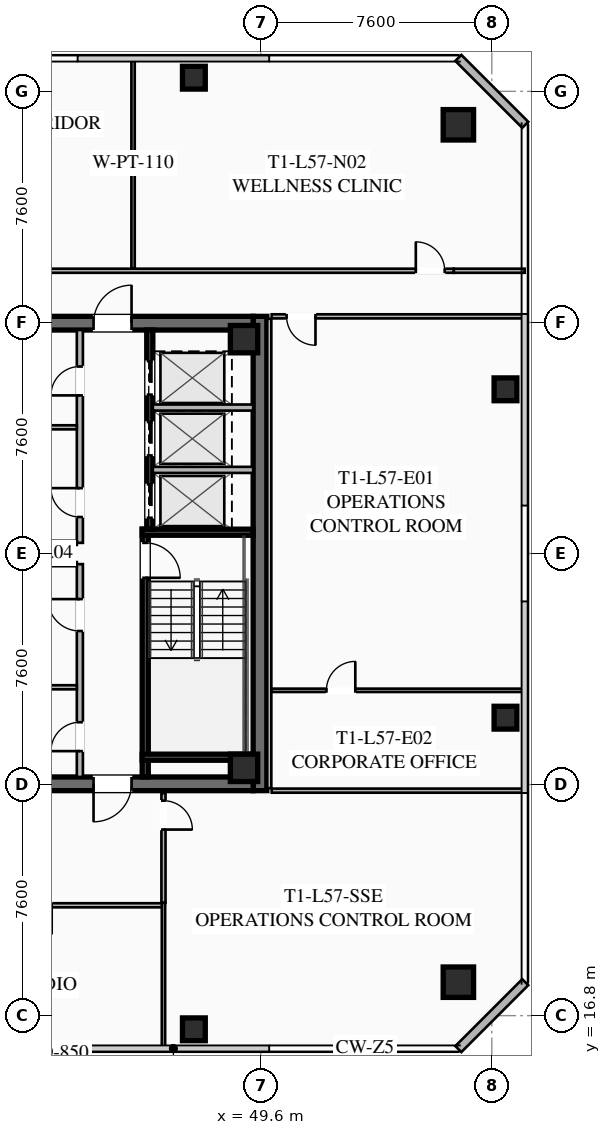
"""IFC4 building model, lengths in metres.
Left out: names, types, materials, properties, quantities, classifications, styles, units other than length and angle.
Written with IfcOpenShell. Run it as: python <this file> out.ifc"""

import sys

from ifc_helpers import new_model, si_unit, direction, frame, frame_2d, origin, origin_2d, place, context, subcontext, project, spatial, rectangle, hollow_rectangle, extrude, element, fill, save


model = new_model("IFC4")
c1 = context("Model", 3, precision=1e-05, world=origin(), true_north=direction((0.0, 1.0)))
c2 = subcontext(c1, "Body", "Model", "MODEL_VIEW")
j1 = project(units=[si_unit("LENGTHUNIT", "METRE"), si_unit("PLANEANGLEUNIT", "RADIAN")], contexts=[c1])
p1 = place(None, origin())
s1 = spatial("IfcSite", under=j1, at=p1, CompositionType="ELEMENT")
p2 = place(p1, origin())
s2 = spatial("IfcBuilding", under=s1, at=p2, CompositionType="ELEMENT")
p3 = place(p2, frame((0.0, 0.0, 211.3)))
s3 = spatial("IfcBuildingStorey", under=s2, at=p3, CompositionType="ELEMENT", Elevation=211.3)
p4 = place(p3, frame((49.575, 39.8, 0.0), z_axis=(0.0, 0.0, 1.0), x_axis=(0.0, -1.0, 0.0)))
e1 = element("IfcWall", 1, at=p4, inside=s3, PredefinedType="SHEAR", context=c2, shape_type="SweptSolid", body=[
    extrude(rectangle(XDim=15.6, YDim=0.45, at=frame_2d((7.8, 0.0))), origin(), (0.0, 0.0, 1.0), 3.55),
])
p5 = place(p3, frame((49.35, 24.425, 0.0), z_axis=(0.0, 0.0, 1.0), x_axis=(-1.0, 0.0, 0.0)))
e2 = element("IfcWall", 2, at=p5, inside=s3, PredefinedType="SHEAR", context=c2, shape_type="SweptSolid", body=[
    extrude(rectangle(XDim=14.7, YDim=0.45, at=frame_2d((7.35, 0.0))), origin(), (0.0, 0.0, 1.0), 3.55),
])
p6 = place(p5, frame((9.05, 0.0, 0.0)))
e3 = element("IfcOpeningElement", 3, at=p6, cuts=e2, PredefinedType="OPENING", context=c2, shape_type="SweptSolid", body=[
    extrude(rectangle(XDim=1.25, YDim=2.25, at=frame_2d((0.625, 1.125))), frame((0.0, 0.235, 0.0), z_axis=(0.0, -1.0, 0.0), x_axis=(1.0, 0.0, 0.0)), (0.0, 0.0, 1.0), 0.47),
])
p7 = place(p5, frame((4.0, 0.0, 0.0)))
e4 = element("IfcOpeningElement", 4, at=p7, cuts=e2, PredefinedType="OPENING", context=c2, shape_type="SweptSolid", body=[
    extrude(rectangle(XDim=1.25, YDim=2.25, at=frame_2d((0.625, 1.125))), frame((0.0, 0.235, 0.0), z_axis=(0.0, -1.0, 0.0), x_axis=(1.0, 0.0, 0.0)), (0.0, 0.0, 1.0), 0.47),
])
p8 = place(p3, frame((34.65, 39.575, 0.0), z_axis=(0.0, 0.0, 1.0), x_axis=(1.0, 0.0, 0.0)))
e5 = element("IfcWall", 5, at=p8, inside=s3, PredefinedType="SHEAR", context=c2, shape_type="SweptSolid", body=[
    extrude(rectangle(XDim=14.7, YDim=0.45, at=frame_2d((7.35, 0.0))), origin(), (0.0, 0.0, 1.0), 3.55),
])
p9 = place(p8, frame((4.4, 0.0, 0.0)))
e6 = element("IfcOpeningElement", 6, at=p9, cuts=e5, PredefinedType="OPENING", context=c2, shape_type="SweptSolid", body=[
    extrude(rectangle(XDim=1.25, YDim=2.25, at=frame_2d((0.625, 1.125))), frame((0.0, 0.235, 0.0), z_axis=(0.0, -1.0, 0.0), x_axis=(1.0, 0.0, 0.0)), (0.0, 0.0, 1.0), 0.47),
])
p10 = place(p8, frame((9.45, 0.0, 0.0)))
e7 = element("IfcOpeningElement", 7, at=p10, cuts=e5, PredefinedType="OPENING", context=c2, shape_type="SweptSolid", body=[
    extrude(rectangle(XDim=1.25, YDim=2.25, at=frame_2d((0.625, 1.125))), frame((0.0, 0.235, 0.0), z_axis=(0.0, -1.0, 0.0), x_axis=(1.0, 0.0, 0.0)), (0.0, 0.0, 1.0), 0.47),
])
for number, where, z_axis, x_axis in (
    (8, (49.05, 24.95, 0.0), (0.0, 0.0, 1.0), (1.0, 0.0, 0.0)),
    (9, (49.05, 39.05, 0.0), (0.0, 0.0, 1.0), (1.0, 0.0, 0.0)),
):
    element("IfcColumn", number, at=place(p3, frame(where, z_axis=z_axis, x_axis=x_axis)), inside=s3, PredefinedType="COLUMN", context=c2, shape_type="SweptSolid", body=[
        extrude(hollow_rectangle(XDim=0.9, YDim=0.9, WallThickness=0.04, at=origin_2d()), origin(), (0.0, 0.0, 1.0), 3.37),
    ])
for number, where, z_axis, x_axis in (
    (10, (56.1, 17.9, 0.0), (0.0, 0.0, 1.0), (1.0, 0.0, 0.0)),
    (11, (56.1, 46.1, 0.0), (0.0, 0.0, 1.0), (1.0, 0.0, 0.0)),
):
    element("IfcColumn", number, at=place(p3, frame(where, z_axis=z_axis, x_axis=x_axis)), inside=s3, PredefinedType="COLUMN", context=c2, shape_type="SweptSolid", body=[
        extrude(hollow_rectangle(XDim=1.0, YDim=1.0, WallThickness=0.04, at=origin_2d()), origin(), (0.0, 0.0, 1.0), 3.37),
    ])
for number, where, z_axis, x_axis in (
    (12, (47.4, 16.35, 0.0), (0.0, 0.0, 1.0), (1.0, 0.0, 0.0)),
    (13, (57.65, 26.6, 0.0), (0.0, 0.0, 1.0), (1.0, 0.0, 0.0)),
    (14, (57.65, 37.4, 0.0), (0.0, 0.0, 1.0), (1.0, 0.0, 0.0)),
    (15, (47.4, 47.65, 0.0), (0.0, 0.0, 1.0), (1.0, 0.0, 0.0)),
):
    element("IfcColumn", number, at=place(p3, frame(where, z_axis=z_axis, x_axis=x_axis)), inside=s3, PredefinedType="COLUMN", context=c2, shape_type="SweptSolid", body=[
        extrude(hollow_rectangle(XDim=0.75, YDim=0.75, WallThickness=0.032, at=origin_2d()), origin(), (0.0, 0.0, 1.0), 3.37),
    ])
for number, where, z_axis, x_axis in (
    (16, (56.1, 48.3, 0.0), (0.0, 0.0, 1.0), (0.707, -0.707, 0.0)),
    (17, (58.3, 17.9, 0.0), (0.0, 0.0, 1.0), (-0.707, -0.707, 0.0)),
):
    element("IfcWall", number, at=place(p3, frame(where, z_axis=z_axis, x_axis=x_axis)), inside=s3, PredefinedType="SOLIDWALL", context=c2, shape_type="SweptSolid", body=[
        extrude(rectangle(XDim=3.111, YDim=0.28, at=frame_2d((1.556, 0.0))), origin(), (0.0, 0.0, 1.0), 3.37),
    ])
p11 = place(p3, frame((45.8, 32.8, 0.0), z_axis=(0.0, 0.0, 1.0), x_axis=(0.0, -1.0, 0.0)))
e18 = element("IfcWall", 18, at=p11, inside=s3, PredefinedType="SHEAR", context=c2, shape_type="SweptSolid", body=[
    extrude(rectangle(XDim=8.15, YDim=0.2, at=frame_2d((4.075, 0.0))), origin(), (0.0, 0.0, 1.0), 3.37),
])
p12 = place(p11, frame((0.45, 0.0, 0.0)))
e19 = element("IfcOpeningElement", 19, at=p12, cuts=e18, PredefinedType="OPENING", context=c2, shape_type="SweptSolid", body=[
    extrude(rectangle(XDim=1.15, YDim=2.2, at=frame_2d((0.575, 1.1))), frame((0.0, 0.11, 0.0), z_axis=(0.0, -1.0, 0.0), x_axis=(1.0, 0.0, 0.0)), (0.0, 0.0, 1.0), 0.22),
])
for number, where, z_axis, x_axis in (
    (20, (45.7, 32.7, 0.0), (0.0, 0.0, 1.0), (1.0, 0.0, 0.0)),
    (21, (45.7, 25.3, 0.0), (0.0, 0.0, 1.0), (1.0, 0.0, 0.0)),
):
    element("IfcWall", number, at=place(p3, frame(where, z_axis=z_axis, x_axis=x_axis)), inside=s3, PredefinedType="SHEAR", context=c2, shape_type="SweptSolid", body=[
        extrude(rectangle(XDim=3.65, YDim=0.2, at=frame_2d((1.825, 0.0))), origin(), (0.0, 0.0, 1.0), 3.37),
    ])
p13 = place(p3, frame((45.95, 39.35, 0.0), z_axis=(0.0, 0.0, 1.0), x_axis=(0.0, -1.0, 0.0)))
e22 = element("IfcWall", 22, at=p13, inside=s3, PredefinedType="SHEAR", context=c2, shape_type="SweptSolid", body=[
    extrude(rectangle(XDim=6.55, YDim=0.2, at=frame_2d((3.275, 0.0))), origin(), (0.0, 0.0, 1.0), 3.37),
])
p14 = place(p13, frame((5.075, 0.0, 0.0)))
e23 = element("IfcOpeningElement", 23, at=p14, cuts=e22, PredefinedType="OPENING", context=c2, shape_type="SweptSolid", body=[
    extrude(rectangle(XDim=1.1, YDim=2.2, at=frame_2d((0.55, 1.1))), frame((0.0, 0.11, 0.0), z_axis=(0.0, -1.0, 0.0), x_axis=(1.0, 0.0, 0.0)), (0.0, 0.0, 1.0), 0.22),
])
p15 = place(p13, frame((3.025, 0.0, 0.0)))
e24 = element("IfcOpeningElement", 24, at=p15, cuts=e22, PredefinedType="OPENING", context=c2, shape_type="SweptSolid", body=[
    extrude(rectangle(XDim=1.1, YDim=2.2, at=frame_2d((0.55, 1.1))), frame((0.0, 0.11, 0.0), z_axis=(0.0, -1.0, 0.0), x_axis=(1.0, 0.0, 0.0)), (0.0, 0.0, 1.0), 0.22),
])
p16 = place(p13, frame((1.025, 0.0, 0.0)))
e25 = element("IfcOpeningElement", 25, at=p16, cuts=e22, PredefinedType="OPENING", context=c2, shape_type="SweptSolid", body=[
    extrude(rectangle(XDim=1.1, YDim=2.2, at=frame_2d((0.55, 1.1))), frame((0.0, 0.11, 0.0), z_axis=(0.0, -1.0, 0.0), x_axis=(1.0, 0.0, 0.0)), (0.0, 0.0, 1.0), 0.22),
])
for number, where, z_axis, x_axis in (
    (26, (46.05, 34.75, 0.0), (0.0, 0.0, 1.0), (1.0, 0.0, 0.0)),
    (27, (46.05, 36.8, 0.0), (0.0, 0.0, 1.0), (1.0, 0.0, 0.0)),
):
    element("IfcWall", number, at=place(p3, frame(where, z_axis=z_axis, x_axis=x_axis)), inside=s3, PredefinedType="SOLIDWALL", context=c2, shape_type="SweptSolid", body=[
        extrude(rectangle(XDim=3.3, YDim=0.2, at=frame_2d((1.65, 0.0))), origin(), (0.0, 0.0, 1.0), 3.37),
    ])
p17 = place(p3, frame((43.65, 24.65, 0.0), z_axis=(0.0, 0.0, 1.0), x_axis=(0.0, 1.0, 0.0)))
e28 = element("IfcWall", 28, at=p17, inside=s3, PredefinedType="SOLIDWALL", context=c2, shape_type="SweptSolid", body=[
    extrude(rectangle(XDim=7.0, YDim=0.2, at=frame_2d((3.5, 0.0))), origin(), (0.0, 0.0, 1.0), 2.723),
])
p18 = place(p17, frame((0.85, 0.0, 0.0)))
e29 = element("IfcOpeningElement", 29, at=p18, cuts=e28, PredefinedType="OPENING", context=c2, shape_type="SweptSolid", body=[
    extrude(rectangle(XDim=0.95, YDim=2.05, at=frame_2d((0.475, 1.025))), frame((0.0, 0.11, 0.0), z_axis=(0.0, -1.0, 0.0), x_axis=(1.0, 0.0, 0.0)), (0.0, 0.0, 1.0), 0.22),
])
p19 = place(p17, frame((4.8, 0.0, 0.0)))
e30 = element("IfcOpeningElement", 30, at=p19, cuts=e28, PredefinedType="OPENING", context=c2, shape_type="SweptSolid", body=[
    extrude(rectangle(XDim=1.05, YDim=2.2, at=frame_2d((0.525, 1.1))), frame((0.0, 0.11, 0.0), z_axis=(0.0, -1.0, 0.0), x_axis=(1.0, 0.0, 0.0)), (0.0, 0.0, 1.0), 0.22),
])
for number, where, z_axis, x_axis in (
    (31, (41.67, 31.65, 0.0), (0.0, 0.0, 1.0), (1.0, 0.0, 0.0)),
    (32, (41.67, 27.6, 0.0), (0.0, 0.0, 1.0), (1.0, 0.0, 0.0)),
):
    element("IfcWall", number, at=place(p3, frame(where, z_axis=z_axis, x_axis=x_axis)), inside=s3, PredefinedType="PARTITIONING", context=c2, shape_type="SweptSolid", body=[
        extrude(rectangle(XDim=1.88, YDim=0.135, at=frame_2d((0.94, 0.0))), origin(), (0.0, 0.0, 1.0), 2.723),
    ])
p20 = place(p3, frame((43.65, 32.35, 0.0), z_axis=(0.0, 0.0, 1.0), x_axis=(0.0, 1.0, 0.0)))
e33 = element("IfcWall", 33, at=p20, inside=s3, PredefinedType="SOLIDWALL", context=c2, shape_type="SweptSolid", body=[
    extrude(rectangle(XDim=7.0, YDim=0.2, at=frame_2d((3.5, 0.0))), origin(), (0.0, 0.0, 1.0), 2.723),
])
p21 = place(p20, frame((0.85, 0.0, 0.0)))
e34 = element("IfcOpeningElement", 34, at=p21, cuts=e33, PredefinedType="OPENING", context=c2, shape_type="SweptSolid", body=[
    extrude(rectangle(XDim=0.95, YDim=2.05, at=frame_2d((0.475, 1.025))), frame((0.0, 0.11, 0.0), z_axis=(0.0, -1.0, 0.0), x_axis=(1.0, 0.0, 0.0)), (0.0, 0.0, 1.0), 0.22),
])
p22 = place(p20, frame((4.85, 0.0, 0.0)))
e35 = element("IfcOpeningElement", 35, at=p22, cuts=e33, PredefinedType="OPENING", context=c2, shape_type="SweptSolid", body=[
    extrude(rectangle(XDim=0.95, YDim=2.05, at=frame_2d((0.475, 1.025))), frame((0.0, 0.11, 0.0), z_axis=(0.0, -1.0, 0.0), x_axis=(1.0, 0.0, 0.0)), (0.0, 0.0, 1.0), 0.22),
])
for number, where, z_axis, x_axis in (
    (36, (41.67, 32.35, 0.0), (0.0, 0.0, 1.0), (1.0, 0.0, 0.0)),
    (37, (41.67, 36.15, 0.0), (0.0, 0.0, 1.0), (1.0, 0.0, 0.0)),
):
    element("IfcWall", number, at=place(p3, frame(where, z_axis=z_axis, x_axis=x_axis)), inside=s3, PredefinedType="PARTITIONING", context=c2, shape_type="SweptSolid", body=[
        extrude(rectangle(XDim=1.88, YDim=0.135, at=frame_2d((0.94, 0.0))), origin(), (0.0, 0.0, 1.0), 2.723),
    ])
p23 = place(p3, frame((28.05, 41.3, 0.0), z_axis=(0.0, 0.0, 1.0), x_axis=(1.0, 0.0, 0.0)))
e38 = element("IfcWall", 38, at=p23, inside=s3, PredefinedType="PARTITIONING", context=c2, shape_type="SweptSolid", body=[
    extrude(rectangle(XDim=27.9, YDim=0.135, at=frame_2d((13.95, 0.0))), origin(), (0.0, 0.0, 1.0), 2.723),
])
p24 = place(p23, frame((0.3, 0.0, 0.0)))
e39 = element("IfcOpeningElement", 39, at=p24, cuts=e38, PredefinedType="OPENING", context=c2, shape_type="SweptSolid", body=[
    extrude(rectangle(XDim=0.95, YDim=2.05, at=frame_2d((0.475, 1.025))), frame((0.0, 0.077, 0.0), z_axis=(0.0, -1.0, 0.0), x_axis=(1.0, 0.0, 0.0)), (0.0, 0.0, 1.0), 0.155),
])
p25 = place(p23, frame((26.65, 0.0, 0.0)))
e40 = element("IfcOpeningElement", 40, at=p25, cuts=e38, PredefinedType="OPENING", context=c2, shape_type="SweptSolid", body=[
    extrude(rectangle(XDim=0.95, YDim=2.05, at=frame_2d((0.475, 1.025))), frame((0.0, 0.077, 0.0), z_axis=(0.0, -1.0, 0.0), x_axis=(1.0, 0.0, 0.0)), (0.0, 0.0, 1.0), 0.155),
])
p26 = place(p3, frame((55.95, 41.3, 0.0), z_axis=(0.0, 0.0, 1.0), x_axis=(1.0, 0.0, 0.0)))
e41 = element("IfcWall", 41, at=p26, inside=s3, PredefinedType="PARTITIONING", context=c2, shape_type="SweptSolid", body=[
    extrude(rectangle(XDim=2.33, YDim=0.135, at=frame_2d((1.165, 0.0))), origin(), (0.0, 0.0, 1.0), 2.723),
])
p27 = place(p3, frame((45.4, 41.38, 0.0), z_axis=(0.0, 0.0, 1.0), x_axis=(0.0, 1.0, 0.0)))
e42 = element("IfcWall", 42, at=p27, inside=s3, PredefinedType="PARTITIONING", context=c2, shape_type="SweptSolid", body=[
    extrude(rectangle(XDim=6.9, YDim=0.11, at=frame_2d((3.45, 0.0))), origin(), (0.0, 0.0, 1.0), 2.723),
])
p28 = place(p3, frame((46.4, 20.43, 0.0), z_axis=(0.0, 0.0, 1.0), x_axis=(-1.0, 0.0, 0.0)))
e43 = element("IfcWall", 43, at=p28, inside=s3, PredefinedType="PARTITIONING", context=c2, shape_type="SweptSolid", body=[
    extrude(rectangle(XDim=18.35, YDim=0.135, at=frame_2d((9.175, 0.0))), origin(), (0.0, 0.0, 1.0), 2.723),
])
p29 = place(p28, frame((17.02, 0.0, 0.0)))
e44 = element("IfcOpeningElement", 44, at=p29, cuts=e43, PredefinedType="OPENING", context=c2, shape_type="SweptSolid", body=[
    extrude(rectangle(XDim=0.95, YDim=2.05, at=frame_2d((0.475, 1.025))), frame((0.0, 0.077, 0.0), z_axis=(0.0, -1.0, 0.0), x_axis=(1.0, 0.0, 0.0)), (0.0, 0.0, 1.0), 0.155),
])
p30 = place(p28, frame((3.677, 0.0, 0.0)))
e45 = element("IfcOpeningElement", 45, at=p30, cuts=e43, PredefinedType="OPENING", context=c2, shape_type="SweptSolid", body=[
    extrude(rectangle(XDim=0.95, YDim=2.05, at=frame_2d((0.475, 1.025))), frame((0.0, 0.077, 0.0), z_axis=(0.0, -1.0, 0.0), x_axis=(1.0, 0.0, 0.0)), (0.0, 0.0, 1.0), 0.155),
])
p31 = place(p3, frame((46.4, 24.12, 0.0), z_axis=(0.0, 0.0, 1.0), x_axis=(0.0, -1.0, 0.0)))
e46 = element("IfcWall", 46, at=p31, inside=s3, PredefinedType="PARTITIONING", context=c2, shape_type="SweptSolid", body=[
    extrude(rectangle(XDim=3.61, YDim=0.135, at=frame_2d((1.805, 0.0))), origin(), (0.0, 0.0, 1.0), 2.723),
])
p32 = place(p31, frame((0.25, 0.0, 0.0)))
e47 = element("IfcOpeningElement", 47, at=p32, cuts=e46, PredefinedType="OPENING", context=c2, shape_type="SweptSolid", body=[
    extrude(rectangle(XDim=0.95, YDim=2.05, at=frame_2d((0.475, 1.025))), frame((0.0, 0.077, 0.0), z_axis=(0.0, -1.0, 0.0), x_axis=(1.0, 0.0, 0.0)), (0.0, 0.0, 1.0), 0.155),
])
p33 = place(p3, frame((46.4, 15.72, 0.0), z_axis=(0.0, 0.0, 1.0), x_axis=(0.0, 1.0, 0.0)))
e48 = element("IfcWall", 48, at=p33, inside=s3, PredefinedType="PARTITIONING", context=c2, shape_type="SweptSolid", body=[
    extrude(rectangle(XDim=4.79, YDim=0.11, at=frame_2d((2.395, 0.0))), origin(), (0.0, 0.0, 1.0), 2.723),
])
p34 = place(p3, frame((49.88, 39.72, 0.0), z_axis=(0.0, 0.0, 1.0), x_axis=(0.0, -1.0, 0.0)))
e49 = element("IfcWall", 49, at=p34, inside=s3, PredefinedType="PARTITIONING", context=c2, shape_type="SweptSolid", body=[
    extrude(rectangle(XDim=15.44, YDim=0.135, at=frame_2d((7.72, 0.0))), origin(), (0.0, 0.0, 1.0), 2.723),
])
p35 = place(p3, frame((58.28, 39.8, 0.0), z_axis=(0.0, 0.0, 1.0), x_axis=(-1.0, 0.0, 0.0)))
e50 = element("IfcWall", 50, at=p35, inside=s3, PredefinedType="PARTITIONING", context=c2, shape_type="SweptSolid", body=[
    extrude(rectangle(XDim=8.32, YDim=0.135, at=frame_2d((4.16, 0.0))), origin(), (0.0, 0.0, 1.0), 2.723),
])
p36 = place(p35, frame((6.88, 0.0, 0.0)))
e51 = element("IfcOpeningElement", 51, at=p36, cuts=e50, PredefinedType="OPENING", context=c2, shape_type="SweptSolid", body=[
    extrude(rectangle(XDim=0.95, YDim=2.05, at=frame_2d((0.475, 1.025))), frame((0.0, 0.077, 0.0), z_axis=(0.0, -1.0, 0.0), x_axis=(1.0, 0.0, 0.0)), (0.0, 0.0, 1.0), 0.155),
])
p37 = place(p3, frame((49.96, 24.2, 0.0), z_axis=(0.0, 0.0, 1.0), x_axis=(1.0, 0.0, 0.0)))
e52 = element("IfcWall", 52, at=p37, inside=s3, PredefinedType="PARTITIONING", context=c2, shape_type="SweptSolid", body=[
    extrude(rectangle(XDim=8.32, YDim=0.135, at=frame_2d((4.16, 0.0))), origin(), (0.0, 0.0, 1.0), 2.723),
])
p38 = place(p3, frame((49.96, 27.5, 0.0), z_axis=(0.0, 0.0, 1.0), x_axis=(1.0, 0.0, 0.0)))
e53 = element("IfcWall", 53, at=p38, inside=s3, PredefinedType="PARTITIONING", context=c2, shape_type="SweptSolid", body=[
    extrude(rectangle(XDim=8.32, YDim=0.11, at=frame_2d((4.16, 0.0))), origin(), (0.0, 0.0, 1.0), 2.723),
])
p39 = place(p38, frame((1.8, 0.0, 0.0)))
e54 = element("IfcOpeningElement", 54, at=p39, cuts=e53, PredefinedType="OPENING", context=c2, shape_type="SweptSolid", body=[
    extrude(rectangle(XDim=0.95, YDim=2.05, at=frame_2d((0.475, 1.025))), frame((0.0, 0.065, 0.0), z_axis=(0.0, -1.0, 0.0), x_axis=(1.0, 0.0, 0.0)), (0.0, 0.0, 1.0), 0.13),
])
p40 = place(p10, origin())
e55 = element("IfcDoor", 55, at=p40, inside=s3, OperationType="SINGLE_SWING_RIGHT", PredefinedType="DOOR", context=c2, shape_type="SweptSolid", body=[
    extrude(rectangle(XDim=1.25, YDim=2.25, at=frame_2d((0.625, 1.125))), frame((0.0, 0.025, 0.0), z_axis=(0.0, -1.0, 0.0), x_axis=(1.0, 0.0, 0.0)), (0.0, 0.0, 1.0), 0.05),
])
fill(e7, e55)
p41 = place(p7, origin())
e56 = element("IfcDoor", 56, at=p41, inside=s3, OperationType="SINGLE_SWING_RIGHT", PredefinedType="DOOR", context=c2, shape_type="SweptSolid", body=[
    extrude(rectangle(XDim=1.25, YDim=2.25, at=frame_2d((0.625, 1.125))), frame((0.0, 0.025, 0.0), z_axis=(0.0, -1.0, 0.0), x_axis=(1.0, 0.0, 0.0)), (0.0, 0.0, 1.0), 0.05),
])
fill(e4, e56)
p42 = place(p12, origin())
e57 = element("IfcDoor", 57, at=p42, inside=s3, OperationType="SINGLE_SWING_RIGHT", PredefinedType="DOOR", context=c2, shape_type="SweptSolid", body=[
    extrude(rectangle(XDim=1.15, YDim=2.2, at=frame_2d((0.575, 1.1))), frame((0.0, 0.025, 0.0), z_axis=(0.0, -1.0, 0.0), x_axis=(1.0, 0.0, 0.0)), (0.0, 0.0, 1.0), 0.05),
])
fill(e19, e57)
p43 = place(p18, origin())
e58 = element("IfcDoor", 58, at=p43, inside=s3, OperationType="SINGLE_SWING_LEFT", PredefinedType="DOOR", context=c2, shape_type="SweptSolid", body=[
    extrude(rectangle(XDim=0.95, YDim=2.05, at=frame_2d((0.475, 1.025))), frame((0.0, 0.025, 0.0), z_axis=(0.0, -1.0, 0.0), x_axis=(1.0, 0.0, 0.0)), (0.0, 0.0, 1.0), 0.05),
])
fill(e29, e58)
p44 = place(p19, origin())
e59 = element("IfcDoor", 59, at=p44, inside=s3, OperationType="SINGLE_SWING_RIGHT", PredefinedType="DOOR", context=c2, shape_type="SweptSolid", body=[
    extrude(rectangle(XDim=1.05, YDim=2.2, at=frame_2d((0.525, 1.1))), frame((0.0, 0.025, 0.0), z_axis=(0.0, -1.0, 0.0), x_axis=(1.0, 0.0, 0.0)), (0.0, 0.0, 1.0), 0.05),
])
fill(e30, e59)
p45 = place(p21, origin())
e60 = element("IfcDoor", 60, at=p45, inside=s3, OperationType="SINGLE_SWING_RIGHT", PredefinedType="DOOR", context=c2, shape_type="SweptSolid", body=[
    extrude(rectangle(XDim=0.95, YDim=2.05, at=frame_2d((0.475, 1.025))), frame((0.0, 0.025, 0.0), z_axis=(0.0, -1.0, 0.0), x_axis=(1.0, 0.0, 0.0)), (0.0, 0.0, 1.0), 0.05),
])
fill(e34, e60)
p46 = place(p22, origin())
e61 = element("IfcDoor", 61, at=p46, inside=s3, OperationType="SINGLE_SWING_LEFT", PredefinedType="DOOR", context=c2, shape_type="SweptSolid", body=[
    extrude(rectangle(XDim=0.95, YDim=2.05, at=frame_2d((0.475, 1.025))), frame((0.0, 0.025, 0.0), z_axis=(0.0, -1.0, 0.0), x_axis=(1.0, 0.0, 0.0)), (0.0, 0.0, 1.0), 0.05),
])
fill(e35, e61)
p47 = place(p25, origin())
e62 = element("IfcDoor", 62, at=p47, inside=s3, OperationType="SINGLE_SWING_LEFT", PredefinedType="DOOR", context=c2, shape_type="SweptSolid", body=[
    extrude(rectangle(XDim=0.95, YDim=2.05, at=frame_2d((0.475, 1.025))), frame((0.0, 0.025, 0.0), z_axis=(0.0, -1.0, 0.0), x_axis=(1.0, 0.0, 0.0)), (0.0, 0.0, 1.0), 0.05),
])
fill(e40, e62)
p48 = place(p32, origin())
e63 = element("IfcDoor", 63, at=p48, inside=s3, OperationType="SINGLE_SWING_RIGHT", PredefinedType="DOOR", context=c2, shape_type="SweptSolid", body=[
    extrude(rectangle(XDim=0.95, YDim=2.05, at=frame_2d((0.475, 1.025))), frame((0.0, 0.025, 0.0), z_axis=(0.0, -1.0, 0.0), x_axis=(1.0, 0.0, 0.0)), (0.0, 0.0, 1.0), 0.05),
])
fill(e47, e63)
p49 = place(p36, origin())
e64 = element("IfcDoor", 64, at=p49, inside=s3, OperationType="SINGLE_SWING_LEFT", PredefinedType="DOOR", context=c2, shape_type="SweptSolid", body=[
    extrude(rectangle(XDim=0.95, YDim=2.05, at=frame_2d((0.475, 1.025))), frame((0.0, 0.025, 0.0), z_axis=(0.0, -1.0, 0.0), x_axis=(1.0, 0.0, 0.0)), (0.0, 0.0, 1.0), 0.05),
])
fill(e51, e64)
p50 = place(p39, origin())
e65 = element("IfcDoor", 65, at=p50, inside=s3, OperationType="SINGLE_SWING_RIGHT", PredefinedType="DOOR", context=c2, shape_type="SweptSolid", body=[
    extrude(rectangle(XDim=0.95, YDim=2.05, at=frame_2d((0.475, 1.025))), frame((0.0, 0.025, 0.0), z_axis=(0.0, -1.0, 0.0), x_axis=(1.0, 0.0, 0.0)), (0.0, 0.0, 1.0), 0.05),
])
fill(e54, e65)
p51 = place(p14, origin())
e66 = element("IfcDoor", 66, at=p51, inside=s3, OperationType="SLIDING_TO_LEFT", PredefinedType="DOOR", context=c2, shape_type="SweptSolid", body=[
    extrude(rectangle(XDim=1.1, YDim=2.2, at=frame_2d((0.55, 1.1))), frame((0.0, 0.025, 0.0), z_axis=(0.0, -1.0, 0.0), x_axis=(1.0, 0.0, 0.0)), (0.0, 0.0, 1.0), 0.05),
])
fill(e23, e66)
p52 = place(p15, origin())
e67 = element("IfcDoor", 67, at=p52, inside=s3, OperationType="SLIDING_TO_LEFT", PredefinedType="DOOR", context=c2, shape_type="SweptSolid", body=[
    extrude(rectangle(XDim=1.1, YDim=2.2, at=frame_2d((0.55, 1.1))), frame((0.0, 0.025, 0.0), z_axis=(0.0, -1.0, 0.0), x_axis=(1.0, 0.0, 0.0)), (0.0, 0.0, 1.0), 0.05),
])
fill(e24, e67)
p53 = place(p16, origin())
e68 = element("IfcDoor", 68, at=p53, inside=s3, OperationType="SLIDING_TO_LEFT", PredefinedType="DOOR", context=c2, shape_type="SweptSolid", body=[
    extrude(rectangle(XDim=1.1, YDim=2.2, at=frame_2d((0.55, 1.1))), frame((0.0, 0.025, 0.0), z_axis=(0.0, -1.0, 0.0), x_axis=(1.0, 0.0, 0.0)), (0.0, 0.0, 1.0), 0.05),
])
fill(e25, e68)
save(model, sys.argv[1])
